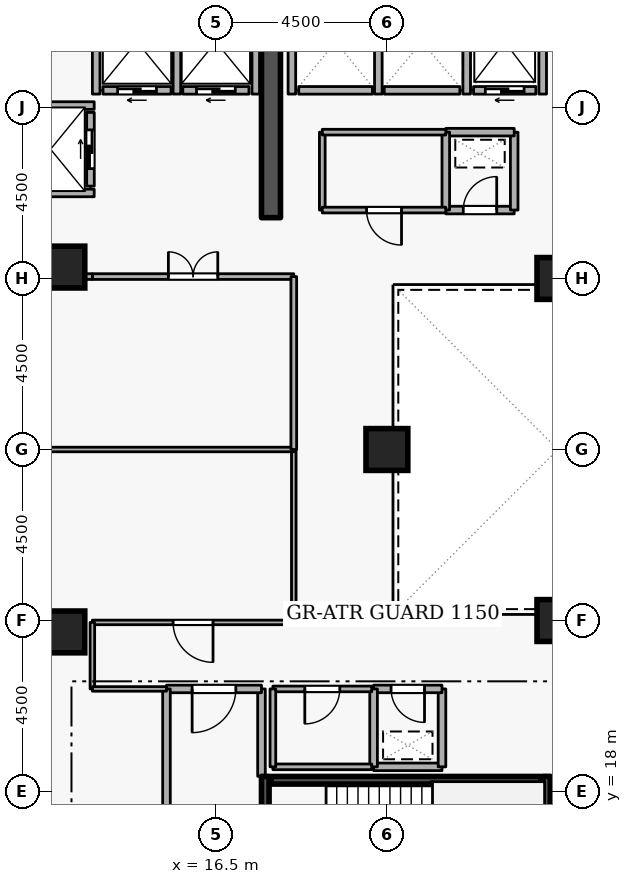
"""IFC4 building model, lengths in metres.
Left out: names, types, materials, properties, quantities, classifications, styles, units other than length and angle.
Written with IfcOpenShell. Run it as: python <this file> out.ifc"""

import sys

from ifc_helpers import new_model, si_unit, direction, frame, frame_2d, origin, origin_2d, place, context, subcontext, project, spatial, rectangle, extrude, element, fill, save


model = new_model("IFC4")
c1 = context("Model", 3, precision=1e-05, world=origin(), true_north=direction((0.0, 1.0)))
c2 = subcontext(c1, "Body", "Model", "MODEL_VIEW")
j1 = project(units=[si_unit("LENGTHUNIT", "METRE"), si_unit("PLANEANGLEUNIT", "RADIAN")], contexts=[c1])
p1 = place(None, origin())
s1 = spatial("IfcSite", under=j1, at=p1, CompositionType="ELEMENT")
p2 = place(p1, origin())
s2 = spatial("IfcBuilding", under=s1, at=p2, CompositionType="ELEMENT")
p3 = place(p2, frame((0.0, 0.0, 152.7)))
s3 = spatial("IfcBuildingStorey", under=s2, at=p3, CompositionType="ELEMENT", Elevation=152.7)
p4 = place(p3, frame((17.95, 33.1, 0.0), z_axis=(0.0, 0.0, 1.0), x_axis=(0.0, 1.0, 0.0)))
e1 = element("IfcWall", 1, at=p4, inside=s3, PredefinedType="SHEAR", context=c2, shape_type="SweptSolid", body=[
    extrude(rectangle(XDim=5.8, YDim=0.5, at=frame_2d((2.9, 0.0))), origin(), (0.0, 0.0, 1.0), 3.6),
])
for number, where, z_axis, x_axis in (
    (2, (12.5, 22.2, 0.0), (0.0, 0.0, 1.0), (1.0, 0.0, 0.0)),
    (3, (12.5, 31.8, 0.0), (0.0, 0.0, 1.0), (1.0, 0.0, 0.0)),
    (4, (25.5, 22.5, 0.0), (0.0, 0.0, 1.0), (1.0, 0.0, 0.0)),
    (5, (25.5, 31.5, 0.0), (0.0, 0.0, 1.0), (1.0, 0.0, 0.0)),
    (6, (21.0, 27.0, 0.0), (0.0, 0.0, 1.0), (1.0, 0.0, 0.0)),
):
    element("IfcColumn", number, at=place(p3, frame(where, z_axis=z_axis, x_axis=x_axis)), inside=s3, PredefinedType="COLUMN", context=c2, shape_type="SweptSolid", body=[
        extrude(rectangle(XDim=1.1, YDim=1.1, at=origin_2d()), origin(), (0.0, 0.0, 1.0), 3.6),
    ])
p5 = place(p3, frame((24.92, 36.45, 0.0), z_axis=(0.0, 0.0, 1.0), x_axis=(-1.0, 0.0, 0.0)))
e7 = element("IfcWall", 7, at=p5, inside=s3, PredefinedType="STANDARD", context=c2, shape_type="SweptSolid", body=[
    extrude(rectangle(XDim=1.64, YDim=0.2, at=frame_2d((0.82, 0.0))), origin(), (0.0, 0.0, 1.0), 3.34),
])
p6 = place(p5, frame((0.31, 0.0, 0.0)))
e8 = element("IfcOpeningElement", 8, at=p6, cuts=e7, PredefinedType="OPENING", context=c2, shape_type="SweptSolid", body=[
    extrude(rectangle(XDim=1.02, YDim=2.06, at=frame_2d((0.51, 1.03))), frame((0.0, 0.11, 0.0), z_axis=(0.0, -1.0, 0.0), x_axis=(1.0, 0.0, 0.0)), (0.0, 0.0, 1.0), 0.22),
])
p7 = place(p3, frame((22.92, 36.45, 0.0), z_axis=(0.0, 0.0, 1.0), x_axis=(-1.0, 0.0, 0.0)))
e9 = element("IfcWall", 9, at=p7, inside=s3, PredefinedType="STANDARD", context=c2, shape_type="SweptSolid", body=[
    extrude(rectangle(XDim=1.99, YDim=0.2, at=frame_2d((0.995, 0.0))), origin(), (0.0, 0.0, 1.0), 3.34),
])
p8 = place(p3, frame((20.62, 36.45, 0.0), z_axis=(0.0, 0.0, 1.0), x_axis=(-1.0, 0.0, 0.0)))
e10 = element("IfcWall", 10, at=p8, inside=s3, PredefinedType="STANDARD", context=c2, shape_type="SweptSolid", body=[
    extrude(rectangle(XDim=1.94, YDim=0.2, at=frame_2d((0.97, 0.0))), origin(), (0.0, 0.0, 1.0), 3.34),
])
p9 = place(p3, frame((17.37, 36.45, 0.0), z_axis=(0.0, 0.0, 1.0), x_axis=(-1.0, 0.0, 0.0)))
e11 = element("IfcWall", 11, at=p9, inside=s3, PredefinedType="STANDARD", context=c2, shape_type="SweptSolid", body=[
    extrude(rectangle(XDim=1.74, YDim=0.2, at=frame_2d((0.87, 0.0))), origin(), (0.0, 0.0, 1.0), 3.34),
])
p10 = place(p9, frame((0.36, 0.0, 0.0)))
e12 = element("IfcOpeningElement", 12, at=p10, cuts=e11, PredefinedType="OPENING", context=c2, shape_type="SweptSolid", body=[
    extrude(rectangle(XDim=1.02, YDim=2.06, at=frame_2d((0.51, 1.03))), frame((0.0, 0.11, 0.0), z_axis=(0.0, -1.0, 0.0), x_axis=(1.0, 0.0, 0.0)), (0.0, 0.0, 1.0), 0.22),
])
p11 = place(p3, frame((15.32, 36.45, 0.0), z_axis=(0.0, 0.0, 1.0), x_axis=(-1.0, 0.0, 0.0)))
e13 = element("IfcWall", 13, at=p11, inside=s3, PredefinedType="STANDARD", context=c2, shape_type="SweptSolid", body=[
    extrude(rectangle(XDim=1.79, YDim=0.2, at=frame_2d((0.895, 0.0))), origin(), (0.0, 0.0, 1.0), 3.34),
])
p12 = place(p11, frame((0.385, 0.0, 0.0)))
e14 = element("IfcOpeningElement", 14, at=p12, cuts=e13, PredefinedType="OPENING", context=c2, shape_type="SweptSolid", body=[
    extrude(rectangle(XDim=1.02, YDim=2.06, at=frame_2d((0.51, 1.03))), frame((0.0, 0.11, 0.0), z_axis=(0.0, -1.0, 0.0), x_axis=(1.0, 0.0, 0.0)), (0.0, 0.0, 1.0), 0.22),
])
p13 = place(p3, frame((13.2, 33.93, 0.0), z_axis=(0.0, 0.0, 1.0), x_axis=(0.0, 1.0, 0.0)))
e15 = element("IfcWall", 15, at=p13, inside=s3, PredefinedType="STANDARD", context=c2, shape_type="SweptSolid", body=[
    extrude(rectangle(XDim=1.94, YDim=0.2, at=frame_2d((0.97, 0.0))), origin(), (0.0, 0.0, 1.0), 3.34),
])
p14 = place(p13, frame((0.46, 0.0, 0.0)))
e16 = element("IfcOpeningElement", 16, at=p14, cuts=e15, PredefinedType="OPENING", context=c2, shape_type="SweptSolid", body=[
    extrude(rectangle(XDim=1.02, YDim=2.06, at=frame_2d((0.51, 1.03))), frame((0.0, 0.11, 0.0), z_axis=(0.0, -1.0, 0.0), x_axis=(1.0, 0.0, 0.0)), (0.0, 0.0, 1.0), 0.22),
])
for number, where, z_axis, x_axis in (
    (17, (25.1, 36.352, 0.0), (0.0, 0.0, 1.0), (0.0, 1.0, 0.0)),
    (18, (23.1, 36.352, 0.0), (0.0, 0.0, 1.0), (0.0, 1.0, 0.0)),
    (19, (20.775, 36.352, 0.0), (0.0, 0.0, 1.0), (0.0, 1.0, 0.0)),
    (20, (18.5, 36.352, 0.0), (0.0, 0.0, 1.0), (0.0, 1.0, 0.0)),
):
    element("IfcWall", number, at=place(p3, frame(where, z_axis=z_axis, x_axis=x_axis)), inside=s3, PredefinedType="STANDARD", context=c2, shape_type="SweptSolid", body=[
        extrude(rectangle(XDim=2.536, YDim=0.2, at=frame_2d((1.268, 0.0))), origin(), (0.0, 0.0, 1.0), 3.34),
    ])
p15 = place(p3, frame((17.55, 36.352, 0.0), z_axis=(0.0, 0.0, 1.0), x_axis=(0.0, 1.0, 0.0)))
e21 = element("IfcWall", 21, at=p15, inside=s3, PredefinedType="STANDARD", context=c2, shape_type="SweptSolid", body=[
    extrude(rectangle(XDim=2.636, YDim=0.2, at=frame_2d((1.318, 0.0))), origin(), (0.0, 0.0, 1.0), 2.545),
])
for number, where, z_axis, x_axis in (
    (22, (15.475, 36.352, 0.0), (0.0, 0.0, 1.0), (0.0, 1.0, 0.0)),
    (23, (13.35, 36.352, 0.0), (0.0, 0.0, 1.0), (0.0, 1.0, 0.0)),
):
    element("IfcWall", number, at=place(p3, frame(where, z_axis=z_axis, x_axis=x_axis)), inside=s3, PredefinedType="STANDARD", context=c2, shape_type="SweptSolid", body=[
        extrude(rectangle(XDim=2.636, YDim=0.2, at=frame_2d((1.318, 0.0))), origin(), (0.0, 0.0, 1.0), 3.34),
    ])
for number, where, z_axis, x_axis in (
    (24, (11.002, 36.05, 0.0), (0.0, 0.0, 1.0), (1.0, 0.0, 0.0)),
    (25, (11.002, 33.75, 0.0), (0.0, 0.0, 1.0), (1.0, 0.0, 0.0)),
):
    element("IfcWall", number, at=place(p3, frame(where, z_axis=z_axis, x_axis=x_axis)), inside=s3, PredefinedType="STANDARD", context=c2, shape_type="SweptSolid", body=[
        extrude(rectangle(XDim=2.296, YDim=0.2, at=frame_2d((1.148, 0.0))), origin(), (0.0, 0.0, 1.0), 3.34),
    ])
p16 = place(p3, frame((17.8, 15.05, 0.0), z_axis=(0.0, 0.0, 1.0), x_axis=(0.0, 1.0, 0.0)))
e26 = element("IfcWall", 26, at=p16, inside=s3, PredefinedType="SHEAR", context=c2, shape_type="SweptSolid", body=[
    extrude(rectangle(XDim=3.35, YDim=0.2, at=frame_2d((1.675, 0.0))), origin(), (0.0, 0.0, 1.0), 3.6),
])
p17 = place(p16, frame((1.125, 0.0, 0.0)))
e27 = element("IfcOpeningElement", 27, at=p17, cuts=e26, PredefinedType="OPENING", context=c2, shape_type="SweptSolid", body=[
    extrude(rectangle(XDim=1.1, YDim=2.1, at=frame_2d((0.55, 1.05))), frame((0.0, 0.11, 0.0), z_axis=(0.0, -1.0, 0.0), x_axis=(1.0, 0.0, 0.0)), (0.0, 0.0, 1.0), 0.22),
])
p18 = place(p3, frame((25.2, 18.4, 0.0), z_axis=(0.0, 0.0, 1.0), x_axis=(0.0, -1.0, 0.0)))
e28 = element("IfcWall", 28, at=p18, inside=s3, PredefinedType="SHEAR", context=c2, shape_type="SweptSolid", body=[
    extrude(rectangle(XDim=3.35, YDim=0.2, at=frame_2d((1.675, 0.0))), origin(), (0.0, 0.0, 1.0), 3.6),
])
p19 = place(p3, frame((25.05, 18.297, 0.0), z_axis=(0.0, 0.0, 1.0), x_axis=(-1.0, 0.0, 0.0)))
e29 = element("IfcWall", 29, at=p19, inside=s3, PredefinedType="SHEAR", context=c2, shape_type="SweptSolid", body=[
    extrude(rectangle(XDim=7.1, YDim=0.2, at=frame_2d((3.55, 0.0))), origin(), (0.0, 0.0, 1.0), 3.6),
])
p20 = place(p3, frame((17.7, 18.4, 0.0), z_axis=(0.0, 0.0, 1.0), x_axis=(0.0, 1.0, 0.0)))
e30 = element("IfcWall", 30, at=p20, inside=s3, PredefinedType="STANDARD", context=c2, shape_type="SweptSolid", body=[
    extrude(rectangle(XDim=2.3, YDim=0.2, at=frame_2d((1.15, 0.0))), origin(), (0.0, 0.0, 1.0), 2.545),
])
p21 = place(p3, frame((17.7, 20.7, 0.0), z_axis=(0.0, 0.0, 1.0), x_axis=(-1.0, 0.0, 0.0)))
e31 = element("IfcWall", 31, at=p21, inside=s3, PredefinedType="STANDARD", context=c2, shape_type="SweptSolid", body=[
    extrude(rectangle(XDim=2.5, YDim=0.2, at=frame_2d((1.25, 0.0))), origin(), (0.0, 0.0, 1.0), 3.34),
])
p22 = place(p21, frame((0.675, 0.0, 0.0)))
e32 = element("IfcOpeningElement", 32, at=p22, cuts=e31, PredefinedType="OPENING", context=c2, shape_type="SweptSolid", body=[
    extrude(rectangle(XDim=1.15, YDim=2.1, at=frame_2d((0.575, 1.05))), frame((0.0, 0.11, 0.0), z_axis=(0.0, -1.0, 0.0), x_axis=(1.0, 0.0, 0.0)), (0.0, 0.0, 1.0), 0.22),
])
p23 = place(p3, frame((15.2, 20.7, 0.0), z_axis=(0.0, 0.0, 1.0), x_axis=(0.0, -1.0, 0.0)))
e33 = element("IfcWall", 33, at=p23, inside=s3, PredefinedType="STANDARD", context=c2, shape_type="SweptSolid", body=[
    extrude(rectangle(XDim=5.7, YDim=0.2, at=frame_2d((2.85, 0.0))), origin(), (0.0, 0.0, 1.0), 3.34),
])
p24 = place(p3, frame((20.65, 18.65, 0.0), z_axis=(0.0, 0.0, 1.0), x_axis=(1.0, 0.0, 0.0)))
e34 = element("IfcWall", 34, at=p24, inside=s3, PredefinedType="STANDARD", context=c2, shape_type="SweptSolid", body=[
    extrude(rectangle(XDim=1.8, YDim=0.2, at=frame_2d((0.9, 0.0))), origin(), (0.0, 0.0, 1.0), 3.34),
])
p25 = place(p3, frame((22.45, 18.65, 0.0), z_axis=(0.0, 0.0, 1.0), x_axis=(0.0, 1.0, 0.0)))
e35 = element("IfcWall", 35, at=p25, inside=s3, PredefinedType="STANDARD", context=c2, shape_type="SweptSolid", body=[
    extrude(rectangle(XDim=2.05, YDim=0.2, at=frame_2d((1.025, 0.0))), origin(), (0.0, 0.0, 1.0), 3.34),
])
p26 = place(p3, frame((22.45, 20.7, 0.0), z_axis=(0.0, 0.0, 1.0), x_axis=(-1.0, 0.0, 0.0)))
e36 = element("IfcWall", 36, at=p26, inside=s3, PredefinedType="STANDARD", context=c2, shape_type="SweptSolid", body=[
    extrude(rectangle(XDim=1.8, YDim=0.2, at=frame_2d((0.9, 0.0))), origin(), (0.0, 0.0, 1.0), 3.34),
])
p27 = place(p26, frame((0.46, 0.0, 0.0)))
e37 = element("IfcOpeningElement", 37, at=p27, cuts=e36, PredefinedType="OPENING", context=c2, shape_type="SweptSolid", body=[
    extrude(rectangle(XDim=0.88, YDim=2.04, at=frame_2d((0.44, 1.02))), frame((0.0, 0.11, 0.0), z_axis=(0.0, -1.0, 0.0), x_axis=(1.0, 0.0, 0.0)), (0.0, 0.0, 1.0), 0.22),
])
p28 = place(p3, frame((20.65, 20.7, 0.0), z_axis=(0.0, 0.0, 1.0), x_axis=(0.0, -1.0, 0.0)))
e38 = element("IfcWall", 38, at=p28, inside=s3, PredefinedType="STANDARD", context=c2, shape_type="SweptSolid", body=[
    extrude(rectangle(XDim=2.05, YDim=0.2, at=frame_2d((1.025, 0.0))), origin(), (0.0, 0.0, 1.0), 3.34),
])
p29 = place(p3, frame((22.55, 33.3, 0.0), z_axis=(0.0, 0.0, 1.0), x_axis=(1.0, 0.0, 0.0)))
e39 = element("IfcWall", 39, at=p29, inside=s3, PredefinedType="STANDARD", context=c2, shape_type="SweptSolid", body=[
    extrude(rectangle(XDim=1.8, YDim=0.2, at=frame_2d((0.9, 0.0))), origin(), (0.0, 0.0, 1.0), 3.34),
])
p30 = place(p29, frame((0.46, 0.0, 0.0)))
e40 = element("IfcOpeningElement", 40, at=p30, cuts=e39, PredefinedType="OPENING", context=c2, shape_type="SweptSolid", body=[
    extrude(rectangle(XDim=0.88, YDim=2.04, at=frame_2d((0.44, 1.02))), frame((0.0, 0.11, 0.0), z_axis=(0.0, -1.0, 0.0), x_axis=(1.0, 0.0, 0.0)), (0.0, 0.0, 1.0), 0.22),
])
p31 = place(p3, frame((24.35, 33.3, 0.0), z_axis=(0.0, 0.0, 1.0), x_axis=(0.0, 1.0, 0.0)))
e41 = element("IfcWall", 41, at=p31, inside=s3, PredefinedType="STANDARD", context=c2, shape_type="SweptSolid", body=[
    extrude(rectangle(XDim=2.05, YDim=0.2, at=frame_2d((1.025, 0.0))), origin(), (0.0, 0.0, 1.0), 3.34),
])
p32 = place(p3, frame((24.35, 35.35, 0.0), z_axis=(0.0, 0.0, 1.0), x_axis=(-1.0, 0.0, 0.0)))
e42 = element("IfcWall", 42, at=p32, inside=s3, PredefinedType="STANDARD", context=c2, shape_type="SweptSolid", body=[
    extrude(rectangle(XDim=1.8, YDim=0.2, at=frame_2d((0.9, 0.0))), origin(), (0.0, 0.0, 1.0), 3.34),
])
p33 = place(p3, frame((22.55, 35.35, 0.0), z_axis=(0.0, 0.0, 1.0), x_axis=(0.0, -1.0, 0.0)))
e43 = element("IfcWall", 43, at=p33, inside=s3, PredefinedType="STANDARD", context=c2, shape_type="SweptSolid", body=[
    extrude(rectangle(XDim=2.05, YDim=0.2, at=frame_2d((1.025, 0.0))), origin(), (0.0, 0.0, 1.0), 3.34),
])
p34 = place(p3, frame((18.0, 18.65, 0.0), z_axis=(0.0, 0.0, 1.0), x_axis=(1.0, 0.0, 0.0)))
e44 = element("IfcWall", 44, at=p34, inside=s3, PredefinedType="PARTITIONING", context=c2, shape_type="SweptSolid", body=[
    extrude(rectangle(XDim=2.6, YDim=0.15, at=frame_2d((1.3, 0.0))), origin(), (0.0, 0.0, 1.0), 3.34),
])
p35 = place(p3, frame((20.6, 20.7, 0.0), z_axis=(0.0, 0.0, 1.0), x_axis=(-1.0, 0.0, 0.0)))
e45 = element("IfcWall", 45, at=p35, inside=s3, PredefinedType="PARTITIONING", context=c2, shape_type="SweptSolid", body=[
    extrude(rectangle(XDim=2.6, YDim=0.15, at=frame_2d((1.3, 0.0))), origin(), (0.0, 0.0, 1.0), 3.34),
])
p36 = place(p35, frame((0.84, 0.0, 0.0)))
e46 = element("IfcOpeningElement", 46, at=p36, cuts=e45, PredefinedType="OPENING", context=c2, shape_type="SweptSolid", body=[
    extrude(rectangle(XDim=0.92, YDim=2.08, at=frame_2d((0.46, 1.04))), frame((0.0, 0.085, 0.0), z_axis=(0.0, -1.0, 0.0), x_axis=(1.0, 0.0, 0.0)), (0.0, 0.0, 1.0), 0.17),
])
p37 = place(p3, frame((18.0, 20.7, 0.0), z_axis=(0.0, 0.0, 1.0), x_axis=(0.0, -1.0, 0.0)))
e47 = element("IfcWall", 47, at=p37, inside=s3, PredefinedType="PARTITIONING", context=c2, shape_type="SweptSolid", body=[
    extrude(rectangle(XDim=2.05, YDim=0.15, at=frame_2d((1.025, 0.0))), origin(), (0.0, 0.0, 1.0), 2.545),
])
p38 = place(p3, frame((19.3, 33.3, 0.0), z_axis=(0.0, 0.0, 1.0), x_axis=(0.0, 1.0, 0.0)))
e48 = element("IfcWall", 48, at=p38, inside=s3, PredefinedType="PARTITIONING", context=c2, shape_type="SweptSolid", body=[
    extrude(rectangle(XDim=2.05, YDim=0.15, at=frame_2d((1.025, 0.0))), origin(), (0.0, 0.0, 1.0), 3.34),
])
p39 = place(p3, frame((19.3, 35.35, 0.0), z_axis=(0.0, 0.0, 1.0), x_axis=(1.0, 0.0, 0.0)))
e49 = element("IfcWall", 49, at=p39, inside=s3, PredefinedType="PARTITIONING", context=c2, shape_type="SweptSolid", body=[
    extrude(rectangle(XDim=3.25, YDim=0.15, at=frame_2d((1.625, 0.0))), origin(), (0.0, 0.0, 1.0), 3.34),
])
p40 = place(p3, frame((22.55, 33.3, 0.0), z_axis=(0.0, 0.0, 1.0), x_axis=(-1.0, 0.0, 0.0)))
e50 = element("IfcWall", 50, at=p40, inside=s3, PredefinedType="PARTITIONING", context=c2, shape_type="SweptSolid", body=[
    extrude(rectangle(XDim=3.25, YDim=0.15, at=frame_2d((1.625, 0.0))), origin(), (0.0, 0.0, 1.0), 3.34),
])
p41 = place(p40, frame((1.165, 0.0, 0.0)))
e51 = element("IfcOpeningElement", 51, at=p41, cuts=e50, PredefinedType="OPENING", context=c2, shape_type="SweptSolid", body=[
    extrude(rectangle(XDim=0.92, YDim=2.08, at=frame_2d((0.46, 1.04))), frame((0.0, 0.085, 0.0), z_axis=(0.0, -1.0, 0.0), x_axis=(1.0, 0.0, 0.0)), (0.0, 0.0, 1.0), 0.17),
])
p42 = place(p3, frame((18.55, 27.0, 0.0), z_axis=(0.0, 0.0, 1.0), x_axis=(0.0, -1.0, 0.0)))
e52 = element("IfcWall", 52, at=p42, inside=s3, PredefinedType="PARTITIONING", context=c2, shape_type="SweptSolid", body=[
    extrude(rectangle(XDim=4.55, YDim=0.12, at=frame_2d((2.275, 0.0))), origin(), (0.0, 0.0, 1.0), 3.34),
])
p43 = place(p3, frame((18.55, 22.45, 0.0), z_axis=(0.0, 0.0, 1.0), x_axis=(-1.0, 0.0, 0.0)))
e53 = element("IfcWall", 53, at=p43, inside=s3, PredefinedType="PARTITIONING", context=c2, shape_type="SweptSolid", body=[
    extrude(rectangle(XDim=5.3, YDim=0.12, at=frame_2d((2.65, 0.0))), origin(), (0.0, 0.0, 1.0), 3.34),
])
p44 = place(p43, frame((2.125, 0.0, 0.0)))
e54 = element("IfcOpeningElement", 54, at=p44, cuts=e53, PredefinedType="OPENING", context=c2, shape_type="SweptSolid", body=[
    extrude(rectangle(XDim=1.05, YDim=2.1, at=frame_2d((0.525, 1.05))), frame((0.0, 0.07, 0.0), z_axis=(0.0, -1.0, 0.0), x_axis=(1.0, 0.0, 0.0)), (0.0, 0.0, 1.0), 0.14),
])
p45 = place(p3, frame((13.25, 22.45, 0.0), z_axis=(0.0, 0.0, 1.0), x_axis=(0.0, -1.0, 0.0)))
e55 = element("IfcWall", 55, at=p45, inside=s3, PredefinedType="PARTITIONING", context=c2, shape_type="SweptSolid", body=[
    extrude(rectangle(XDim=1.75, YDim=0.12, at=frame_2d((0.875, 0.0))), origin(), (0.0, 0.0, 1.0), 3.34),
])
p46 = place(p3, frame((13.25, 20.7, 0.0), z_axis=(0.0, 0.0, 1.0), x_axis=(1.0, 0.0, 0.0)))
e56 = element("IfcWall", 56, at=p46, inside=s3, PredefinedType="PARTITIONING", context=c2, shape_type="SweptSolid", body=[
    extrude(rectangle(XDim=1.95, YDim=0.12, at=frame_2d((0.975, 0.0))), origin(), (0.0, 0.0, 1.0), 3.34),
])
p47 = place(p3, frame((7.78, 27.0, 0.0), z_axis=(0.0, 0.0, 1.0), x_axis=(1.0, 0.0, 0.0)))
e57 = element("IfcWall", 57, at=p47, inside=s3, PredefinedType="PARTITIONING", context=c2, shape_type="SweptSolid", body=[
    extrude(rectangle(XDim=10.77, YDim=0.12, at=frame_2d((5.385, 0.0))), origin(), (0.0, 0.0, 1.0), 2.932),
])
p48 = place(p3, frame((13.25, 31.55, 0.0), z_axis=(0.0, 0.0, 1.0), x_axis=(1.0, 0.0, 0.0)))
e58 = element("IfcWall", 58, at=p48, inside=s3, PredefinedType="PARTITIONING", context=c2, shape_type="SweptSolid", body=[
    extrude(rectangle(XDim=5.3, YDim=0.15, at=frame_2d((2.65, 0.0))), origin(), (0.0, 0.0, 1.0), 3.34),
])
p49 = place(p48, frame((2.0, 0.0, 0.0)))
e59 = element("IfcOpeningElement", 59, at=p49, cuts=e58, PredefinedType="OPENING", context=c2, shape_type="SweptSolid", body=[
    extrude(rectangle(XDim=1.3, YDim=2.12, at=frame_2d((0.65, 1.06))), frame((0.0, 0.085, 0.0), z_axis=(0.0, -1.0, 0.0), x_axis=(1.0, 0.0, 0.0)), (0.0, 0.0, 1.0), 0.17),
])
p50 = place(p3, frame((18.55, 31.55, 0.0), z_axis=(0.0, 0.0, 1.0), x_axis=(0.0, -1.0, 0.0)))
e60 = element("IfcWall", 60, at=p50, inside=s3, PredefinedType="PARTITIONING", context=c2, shape_type="SweptSolid", body=[
    extrude(rectangle(XDim=4.55, YDim=0.15, at=frame_2d((2.275, 0.0))), origin(), (0.0, 0.0, 1.0), 3.34),
])
p51 = place(p3, frame((10.9, 31.55, 0.0), z_axis=(0.0, 0.0, 1.0), x_axis=(1.0, 0.0, 0.0)))
e61 = element("IfcWall", 61, at=p51, inside=s3, PredefinedType="PARTITIONING", context=c2, shape_type="SweptSolid", body=[
    extrude(rectangle(XDim=2.35, YDim=0.15, at=frame_2d((1.175, 0.0))), origin(), (0.0, 0.0, 1.0), 3.34),
])
p52 = place(p6, origin())
e62 = element("IfcDoor", 62, at=p52, inside=s3, OperationType="SLIDING_TO_LEFT", PredefinedType="DOOR", context=c2, shape_type="SweptSolid", body=[
    extrude(rectangle(XDim=1.02, YDim=2.06, at=frame_2d((0.51, 1.03))), frame((0.0, 0.025, 0.0), z_axis=(0.0, -1.0, 0.0), x_axis=(1.0, 0.0, 0.0)), (0.0, 0.0, 1.0), 0.05),
])
fill(e8, e62)
p53 = place(p10, origin())
e63 = element("IfcDoor", 63, at=p53, inside=s3, OperationType="SLIDING_TO_LEFT", PredefinedType="DOOR", context=c2, shape_type="SweptSolid", body=[
    extrude(rectangle(XDim=1.02, YDim=2.06, at=frame_2d((0.51, 1.03))), frame((0.0, 0.025, 0.0), z_axis=(0.0, -1.0, 0.0), x_axis=(1.0, 0.0, 0.0)), (0.0, 0.0, 1.0), 0.05),
])
fill(e12, e63)
p54 = place(p12, origin())
e64 = element("IfcDoor", 64, at=p54, inside=s3, OperationType="SLIDING_TO_LEFT", PredefinedType="DOOR", context=c2, shape_type="SweptSolid", body=[
    extrude(rectangle(XDim=1.02, YDim=2.06, at=frame_2d((0.51, 1.03))), frame((0.0, 0.025, 0.0), z_axis=(0.0, -1.0, 0.0), x_axis=(1.0, 0.0, 0.0)), (0.0, 0.0, 1.0), 0.05),
])
fill(e14, e64)
p55 = place(p14, origin())
e65 = element("IfcDoor", 65, at=p55, inside=s3, OperationType="SLIDING_TO_LEFT", PredefinedType="DOOR", context=c2, shape_type="SweptSolid", body=[
    extrude(rectangle(XDim=1.02, YDim=2.06, at=frame_2d((0.51, 1.03))), frame((0.0, 0.025, 0.0), z_axis=(0.0, -1.0, 0.0), x_axis=(1.0, 0.0, 0.0)), (0.0, 0.0, 1.0), 0.05),
])
fill(e16, e65)
p56 = place(p22, origin())
e66 = element("IfcDoor", 66, at=p56, inside=s3, OperationType="SINGLE_SWING_RIGHT", PredefinedType="DOOR", context=c2, shape_type="SweptSolid", body=[
    extrude(rectangle(XDim=1.15, YDim=2.1, at=frame_2d((0.575, 1.05))), frame((0.0, 0.025, 0.0), z_axis=(0.0, -1.0, 0.0), x_axis=(1.0, 0.0, 0.0)), (0.0, 0.0, 1.0), 0.05),
])
fill(e32, e66)
p57 = place(p27, origin())
e67 = element("IfcDoor", 67, at=p57, inside=s3, OperationType="SINGLE_SWING_LEFT", PredefinedType="DOOR", context=c2, shape_type="SweptSolid", body=[
    extrude(rectangle(XDim=0.88, YDim=2.04, at=frame_2d((0.44, 1.02))), frame((0.0, 0.025, 0.0), z_axis=(0.0, -1.0, 0.0), x_axis=(1.0, 0.0, 0.0)), (0.0, 0.0, 1.0), 0.05),
])
fill(e37, e67)
p58 = place(p30, origin())
e68 = element("IfcDoor", 68, at=p58, inside=s3, OperationType="SINGLE_SWING_RIGHT", PredefinedType="DOOR", context=c2, shape_type="SweptSolid", body=[
    extrude(rectangle(XDim=0.88, YDim=2.04, at=frame_2d((0.44, 1.02))), frame((0.0, 0.025, 0.0), z_axis=(0.0, -1.0, 0.0), x_axis=(1.0, 0.0, 0.0)), (0.0, 0.0, 1.0), 0.05),
])
fill(e40, e68)
p59 = place(p36, origin())
e69 = element("IfcDoor", 69, at=p59, inside=s3, OperationType="SINGLE_SWING_RIGHT", PredefinedType="DOOR", context=c2, shape_type="SweptSolid", body=[
    extrude(rectangle(XDim=0.92, YDim=2.08, at=frame_2d((0.46, 1.04))), frame((0.0, 0.025, 0.0), z_axis=(0.0, -1.0, 0.0), x_axis=(1.0, 0.0, 0.0)), (0.0, 0.0, 1.0), 0.05),
])
fill(e46, e69)
p60 = place(p41, origin())
e70 = element("IfcDoor", 70, at=p60, inside=s3, OperationType="SINGLE_SWING_LEFT", PredefinedType="DOOR", context=c2, shape_type="SweptSolid", body=[
    extrude(rectangle(XDim=0.92, YDim=2.08, at=frame_2d((0.46, 1.04))), frame((0.0, 0.025, 0.0), z_axis=(0.0, -1.0, 0.0), x_axis=(1.0, 0.0, 0.0)), (0.0, 0.0, 1.0), 0.05),
])
fill(e51, e70)
p61 = place(p44, origin())
e71 = element("IfcDoor", 71, at=p61, inside=s3, OperationType="SINGLE_SWING_LEFT", PredefinedType="DOOR", context=c2, shape_type="SweptSolid", body=[
    extrude(rectangle(XDim=1.05, YDim=2.1, at=frame_2d((0.525, 1.05))), frame((0.0, 0.025, 0.0), z_axis=(0.0, -1.0, 0.0), x_axis=(1.0, 0.0, 0.0)), (0.0, 0.0, 1.0), 0.05),
])
fill(e54, e71)
p62 = place(p49, origin())
e72 = element("IfcDoor", 72, at=p62, inside=s3, OperationType="DOUBLE_DOOR_SINGLE_SWING", PredefinedType="DOOR", context=c2, shape_type="SweptSolid", body=[
    extrude(rectangle(XDim=1.3, YDim=2.12, at=frame_2d((0.65, 1.06))), frame((0.0, 0.025, 0.0), z_axis=(0.0, -1.0, 0.0), x_axis=(1.0, 0.0, 0.0)), (0.0, 0.0, 1.0), 0.05),
])
fill(e59, e72)
save(model, sys.argv[1])
